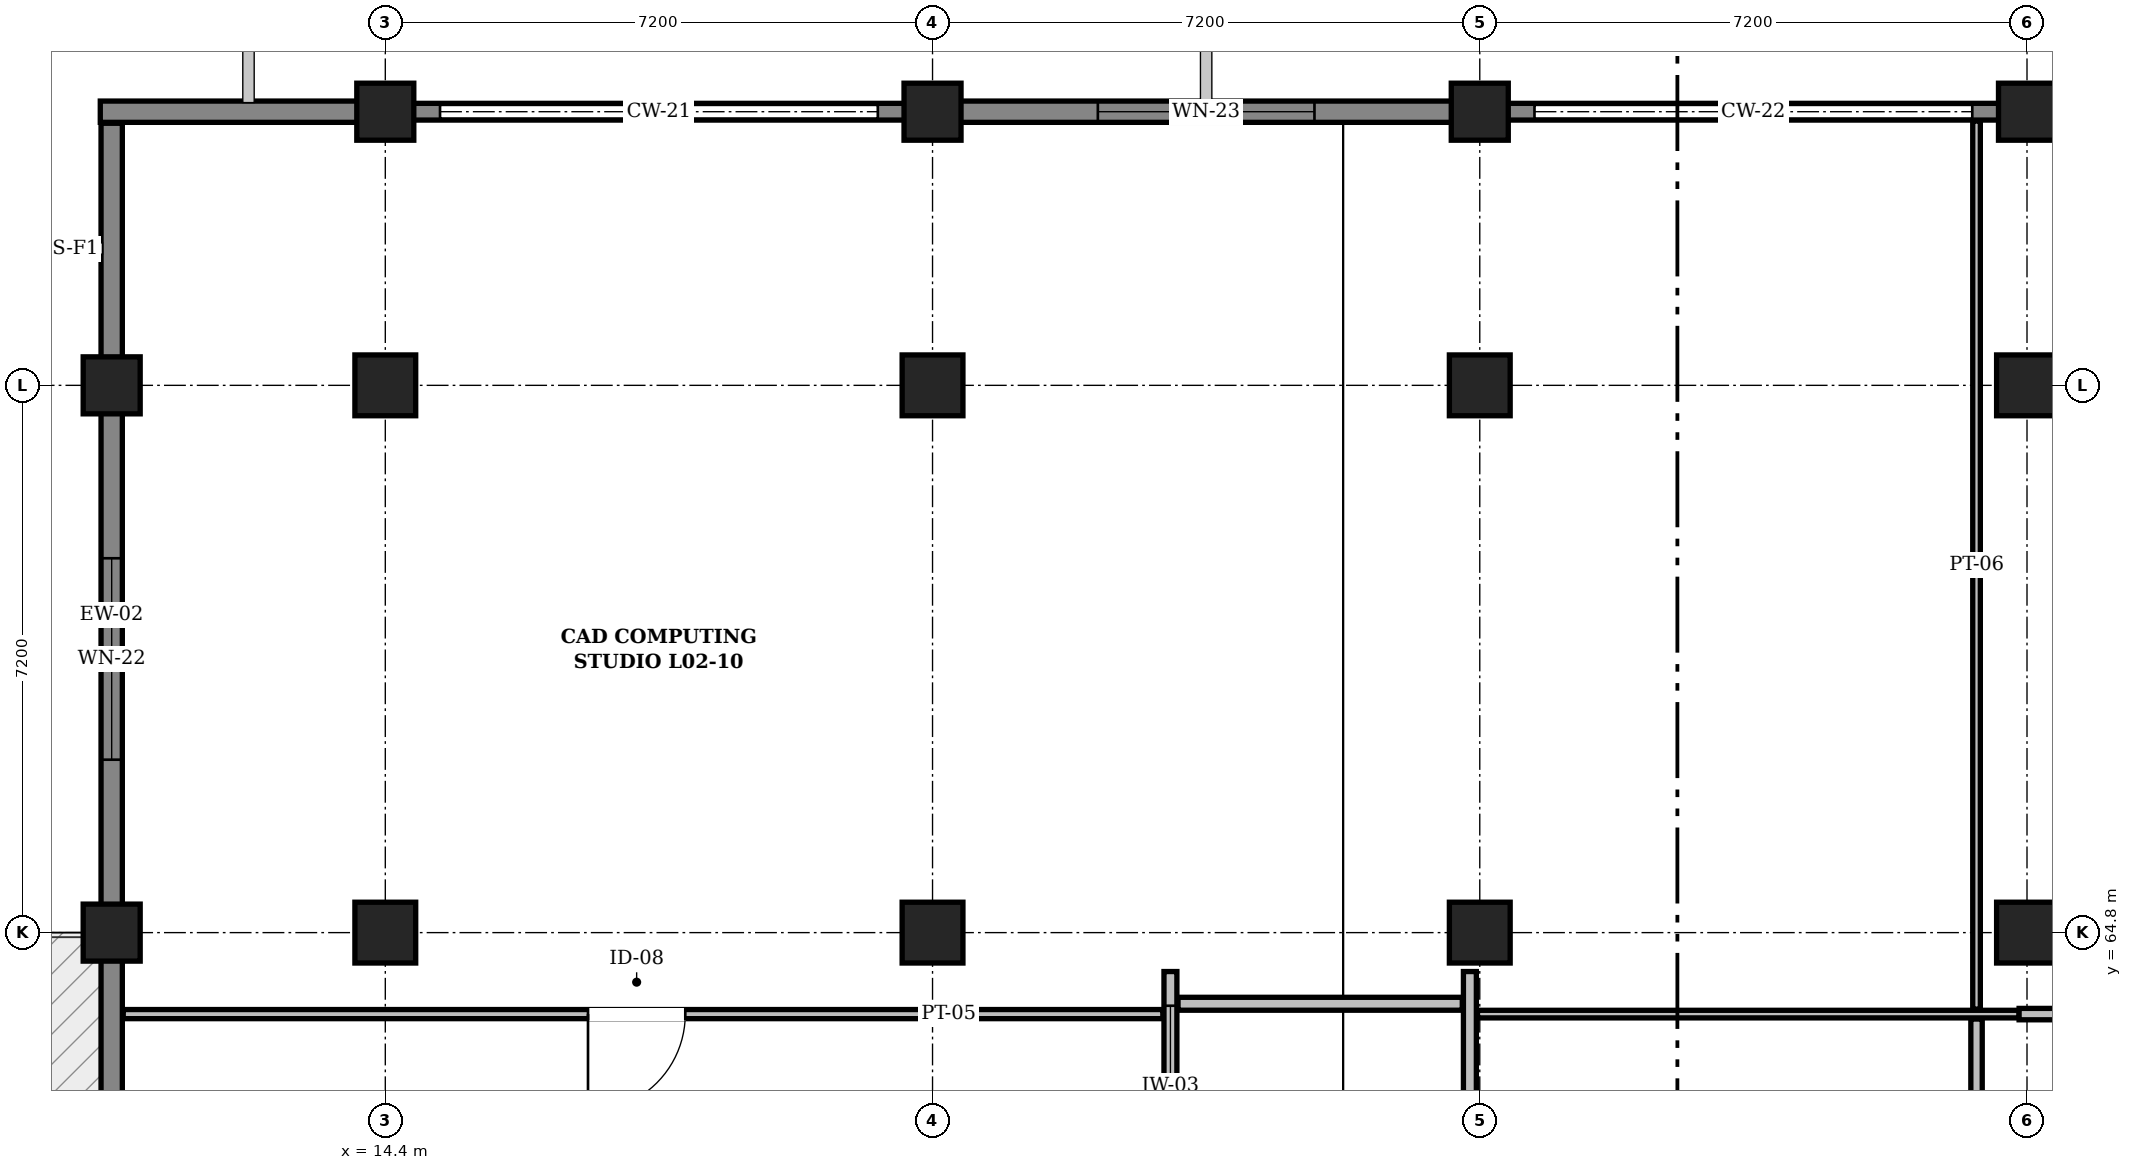
"""IFC4 building model, lengths in metres.
Left out: names, types, materials, properties, quantities, classifications, styles, units other than length and angle.
Written with IfcOpenShell. Run it as: python <this file> out.ifc"""

import sys

from ifc_helpers import new_model, si_unit, direction, frame, frame_2d, origin, origin_2d, place, context, subcontext, project, spatial, rectangle, extrude, element, fill, save


model = new_model("IFC4")
c1 = context("Model", 3, precision=1e-05, world=origin(), true_north=direction((0.0, 1.0)))
c2 = subcontext(c1, "Body", "Model", "MODEL_VIEW")
j1 = project(units=[si_unit("LENGTHUNIT", "METRE"), si_unit("PLANEANGLEUNIT", "RADIAN")], contexts=[c1])
p1 = place(None, origin())
s1 = spatial("IfcSite", under=j1, at=p1, CompositionType="ELEMENT")
p2 = place(p1, origin())
s2 = spatial("IfcBuilding", under=s1, at=p2, CompositionType="ELEMENT")
p3 = place(p2, frame((0.0, 0.0, 9.6)))
s3 = spatial("IfcBuildingStorey", under=s2, at=p3, CompositionType="ELEMENT", Elevation=9.6)
for number, where, z_axis, x_axis in (
    (1, (10.8, 64.8, 0.0), (0.0, 0.0, 1.0), (1.0, 0.0, 0.0)),
    (2, (10.8, 72.0, 0.0), (0.0, 0.0, 1.0), (1.0, 0.0, 0.0)),
):
    element("IfcColumn", number, at=place(p3, frame(where, z_axis=z_axis, x_axis=x_axis)), inside=s3, PredefinedType="COLUMN", context=c2, shape_type="SweptSolid", body=[
        extrude(rectangle(XDim=0.75, YDim=0.75, at=origin_2d()), origin(), (0.0, 0.0, 1.0), 4.8),
    ])
for number, where, z_axis, x_axis in (
    (3, (14.4, 64.8, 0.0), (0.0, 0.0, 1.0), (1.0, 0.0, 0.0)),
    (4, (14.4, 72.0, 0.0), (0.0, 0.0, 1.0), (1.0, 0.0, 0.0)),
):
    element("IfcColumn", number, at=place(p3, frame(where, z_axis=z_axis, x_axis=x_axis)), inside=s3, PredefinedType="COLUMN", context=c2, shape_type="SweptSolid", body=[
        extrude(rectangle(XDim=0.8, YDim=0.8, at=origin_2d()), origin(), (0.0, 0.0, 1.0), 4.8),
    ])
p4 = place(p3, frame((14.4, 75.6, 0.0), z_axis=(0.0, 0.0, 1.0), x_axis=(1.0, 0.0, 0.0)))
e5 = element("IfcColumn", 5, at=p4, inside=s3, PredefinedType="COLUMN", context=c2, shape_type="SweptSolid", body=[
    extrude(rectangle(XDim=0.75, YDim=0.75, at=origin_2d()), origin(), (0.0, 0.0, 1.0), 4.8),
])
for number, where, z_axis, x_axis in (
    (6, (21.6, 64.8, 0.0), (0.0, 0.0, 1.0), (1.0, 0.0, 0.0)),
    (7, (21.6, 72.0, 0.0), (0.0, 0.0, 1.0), (1.0, 0.0, 0.0)),
):
    element("IfcColumn", number, at=place(p3, frame(where, z_axis=z_axis, x_axis=x_axis)), inside=s3, PredefinedType="COLUMN", context=c2, shape_type="SweptSolid", body=[
        extrude(rectangle(XDim=0.8, YDim=0.8, at=origin_2d()), origin(), (0.0, 0.0, 1.0), 4.8),
    ])
p5 = place(p3, frame((21.6, 75.6, 0.0), z_axis=(0.0, 0.0, 1.0), x_axis=(1.0, 0.0, 0.0)))
e8 = element("IfcColumn", 8, at=p5, inside=s3, PredefinedType="COLUMN", context=c2, shape_type="SweptSolid", body=[
    extrude(rectangle(XDim=0.75, YDim=0.75, at=origin_2d()), origin(), (0.0, 0.0, 1.0), 4.8),
])
for number, where, z_axis, x_axis in (
    (9, (28.8, 64.8, 0.0), (0.0, 0.0, 1.0), (1.0, 0.0, 0.0)),
    (10, (28.8, 72.0, 0.0), (0.0, 0.0, 1.0), (1.0, 0.0, 0.0)),
):
    element("IfcColumn", number, at=place(p3, frame(where, z_axis=z_axis, x_axis=x_axis)), inside=s3, PredefinedType="COLUMN", context=c2, shape_type="SweptSolid", body=[
        extrude(rectangle(XDim=0.8, YDim=0.8, at=origin_2d()), origin(), (0.0, 0.0, 1.0), 4.8),
    ])
p6 = place(p3, frame((28.8, 75.6, 0.0), z_axis=(0.0, 0.0, 1.0), x_axis=(1.0, 0.0, 0.0)))
e11 = element("IfcColumn", 11, at=p6, inside=s3, PredefinedType="COLUMN", context=c2, shape_type="SweptSolid", body=[
    extrude(rectangle(XDim=0.75, YDim=0.75, at=origin_2d()), origin(), (0.0, 0.0, 1.0), 4.8),
])
for number, where, z_axis, x_axis in (
    (12, (36.0, 64.8, 0.0), (0.0, 0.0, 1.0), (1.0, 0.0, 0.0)),
    (13, (36.0, 72.0, 0.0), (0.0, 0.0, 1.0), (1.0, 0.0, 0.0)),
):
    element("IfcColumn", number, at=place(p3, frame(where, z_axis=z_axis, x_axis=x_axis)), inside=s3, PredefinedType="COLUMN", context=c2, shape_type="SweptSolid", body=[
        extrude(rectangle(XDim=0.8, YDim=0.8, at=origin_2d()), origin(), (0.0, 0.0, 1.0), 4.8),
    ])
p7 = place(p3, frame((36.0, 75.6, 0.0), z_axis=(0.0, 0.0, 1.0), x_axis=(1.0, 0.0, 0.0)))
e14 = element("IfcColumn", 14, at=p7, inside=s3, PredefinedType="COLUMN", context=c2, shape_type="SweptSolid", body=[
    extrude(rectangle(XDim=0.75, YDim=0.75, at=origin_2d()), origin(), (0.0, 0.0, 1.0), 4.8),
])
p8 = place(p3, frame((10.8, 57.6, 0.0), z_axis=(0.0, 0.0, 1.0), x_axis=(0.0, 1.0, 0.0)))
e15 = element("IfcWall", 15, at=p8, inside=s3, PredefinedType="SOLIDWALL", context=c2, shape_type="SweptSolid", body=[
    extrude(rectangle(XDim=7.2, YDim=0.28, at=frame_2d((3.6, 0.0))), origin(), (0.0, 0.0, 1.0), 4.52),
])
p9 = place(p8, frame((2.94, 0.0, 0.0)))
e16 = element("IfcOpeningElement", 16, at=p9, cuts=e15, PredefinedType="OPENING", context=c2, shape_type="SweptSolid", body=[
    extrude(rectangle(XDim=1.32, YDim=2.2, at=frame_2d((0.66, 1.1))), frame((0.0, 0.152, 0.0), z_axis=(0.0, -1.0, 0.0), x_axis=(1.0, 0.0, 0.0)), (0.0, 0.0, 1.0), 0.304),
])
p10 = place(p3, frame((10.8, 64.8, 0.0), z_axis=(0.0, 0.0, 1.0), x_axis=(0.0, 1.0, 0.0)))
e17 = element("IfcWall", 17, at=p10, inside=s3, PredefinedType="SOLIDWALL", context=c2, shape_type="SweptSolid", body=[
    extrude(rectangle(XDim=7.2, YDim=0.28, at=frame_2d((3.6, 0.0))), origin(), (0.0, 0.0, 1.0), 4.52),
])
p11 = place(p10, frame((2.275, 0.0, 0.95)))
e18 = element("IfcOpeningElement", 18, at=p11, cuts=e17, PredefinedType="OPENING", context=c2, shape_type="SweptSolid", body=[
    extrude(rectangle(XDim=2.65, YDim=1.55, at=frame_2d((1.325, 0.775))), frame((0.0, 0.152, 0.0), z_axis=(0.0, -1.0, 0.0), x_axis=(1.0, 0.0, 0.0)), (0.0, 0.0, 1.0), 0.304),
])
p12 = place(p3, frame((10.8, 72.0, 0.0), z_axis=(0.0, 0.0, 1.0), x_axis=(0.0, 1.0, 0.0)))
e19 = element("IfcWall", 19, at=p12, inside=s3, PredefinedType="SOLIDWALL", context=c2, shape_type="SweptSolid", body=[
    extrude(rectangle(XDim=3.448, YDim=0.28, at=frame_2d((1.724, 0.0))), origin(), (0.0, 0.0, 1.0), 4.52),
])
p13 = place(p3, frame((10.65, 75.6, 0.0), z_axis=(0.0, 0.0, 1.0), x_axis=(1.0, 0.0, 0.0)))
e20 = element("IfcWall", 20, at=p13, inside=s3, PredefinedType="SOLIDWALL", context=c2, shape_type="SweptSolid", body=[
    extrude(rectangle(XDim=3.75, YDim=0.28, at=frame_2d((1.875, 0.0))), origin(), (0.0, 0.0, 1.0), 4.52),
])
p14 = place(p3, frame((14.4, 75.6, 0.0), z_axis=(0.0, 0.0, 1.0), x_axis=(1.0, 0.0, 0.0)))
e21 = element("IfcWall", 21, at=p14, inside=s3, PredefinedType="SOLIDWALL", context=c2, shape_type="SweptSolid", body=[
    extrude(rectangle(XDim=7.2, YDim=0.22, at=frame_2d((3.6, 0.0))), origin(), (0.0, 0.0, 1.0), 1.24),
])
p15 = place(p3, frame((21.6, 75.6, 0.0), z_axis=(0.0, 0.0, 1.0), x_axis=(1.0, 0.0, 0.0)))
e22 = element("IfcWall", 22, at=p15, inside=s3, PredefinedType="SOLIDWALL", context=c2, shape_type="SweptSolid", body=[
    extrude(rectangle(XDim=7.2, YDim=0.28, at=frame_2d((3.6, 0.0))), origin(), (0.0, 0.0, 1.0), 4.52),
])
p16 = place(p15, frame((2.175, 0.0, 0.95)))
e23 = element("IfcOpeningElement", 23, at=p16, cuts=e22, PredefinedType="OPENING", context=c2, shape_type="SweptSolid", body=[
    extrude(rectangle(XDim=2.85, YDim=1.55, at=frame_2d((1.425, 0.775))), frame((0.0, 0.152, 0.0), z_axis=(0.0, -1.0, 0.0), x_axis=(1.0, 0.0, 0.0)), (0.0, 0.0, 1.0), 0.304),
])
p17 = place(p3, frame((28.8, 75.6, 0.0), z_axis=(0.0, 0.0, 1.0), x_axis=(1.0, 0.0, 0.0)))
e24 = element("IfcWall", 24, at=p17, inside=s3, PredefinedType="SOLIDWALL", context=c2, shape_type="SweptSolid", body=[
    extrude(rectangle(XDim=7.2, YDim=0.22, at=frame_2d((3.6, 0.0))), origin(), (0.0, 0.0, 1.0), 1.24),
])
p18 = place(p3, frame((36.0, 75.6, 0.0), z_axis=(0.0, 0.0, 1.0), x_axis=(1.0, 0.0, 0.0)))
e25 = element("IfcWall", 25, at=p18, inside=s3, PredefinedType="SOLIDWALL", context=c2, shape_type="SweptSolid", body=[
    extrude(rectangle(XDim=7.35, YDim=0.28, at=frame_2d((3.675, 0.0))), origin(), (0.0, 0.0, 1.0), 4.52),
])
p19 = place(p18, frame((2.125, 0.0, 0.95)))
e26 = element("IfcOpeningElement", 26, at=p19, cuts=e25, PredefinedType="OPENING", context=c2, shape_type="SweptSolid", body=[
    extrude(rectangle(XDim=3.1, YDim=1.55, at=frame_2d((1.55, 0.775))), frame((0.0, 0.152, 0.0), z_axis=(0.0, -1.0, 0.0), x_axis=(1.0, 0.0, 0.0)), (0.0, 0.0, 1.0), 0.304),
])
p20 = place(p3, frame((28.67, 58.01, 0.0), z_axis=(0.0, 0.0, 1.0), x_axis=(0.0, 1.0, 0.0)))
e27 = element("IfcWall", 27, at=p20, inside=s3, PredefinedType="PARTITIONING", context=c2, shape_type="SweptSolid", body=[
    extrude(rectangle(XDim=6.278, YDim=0.17, at=frame_2d((3.139, 0.0))), origin(), (0.0, 0.0, 1.0), 4.03),
])
p21 = place(p3, frame((24.73, 48.536, 0.0), z_axis=(0.0, 0.0, 1.0), x_axis=(0.0, 1.0, 0.0)))
e28 = element("IfcWall", 28, at=p21, inside=s3, PredefinedType="PARTITIONING", context=c2, shape_type="SweptSolid", body=[
    extrude(rectangle(XDim=15.752, YDim=0.17, at=frame_2d((7.876, 0.0))), origin(), (0.0, 0.0, 1.0), 4.46),
])
p22 = place(p21, frame((7.266, 0.0, 0.0)))
e29 = element("IfcOpeningElement", 29, at=p22, cuts=e28, PredefinedType="OPENING", context=c2, shape_type="SweptSolid", body=[
    extrude(rectangle(XDim=1.22, YDim=2.22, at=frame_2d((0.61, 1.11))), frame((0.0, 0.097, 0.0), z_axis=(0.0, -1.0, 0.0), x_axis=(1.0, 0.0, 0.0)), (0.0, 0.0, 1.0), 0.194),
])
p23 = place(p21, frame((13.202, 0.0, 1.05)))
e30 = element("IfcOpeningElement", 30, at=p23, cuts=e28, PredefinedType="OPENING", context=c2, shape_type="SweptSolid", body=[
    extrude(rectangle(XDim=2.1, YDim=1.05, at=frame_2d((1.05, 0.525))), frame((0.0, 0.097, 0.0), z_axis=(0.0, -1.0, 0.0), x_axis=(1.0, 0.0, 0.0)), (0.0, 0.0, 1.0), 0.194),
])
p24 = place(p3, frame((24.83, 63.864, 0.0), z_axis=(0.0, 0.0, 1.0), x_axis=(1.0, 0.0, 0.0)))
e31 = element("IfcWall", 31, at=p24, inside=s3, PredefinedType="PARTITIONING", context=c2, shape_type="SweptSolid", body=[
    extrude(rectangle(XDim=3.74, YDim=0.17, at=frame_2d((1.87, 0.0))), origin(), (0.0, 0.0, 1.0), 4.46),
])
p25 = place(p3, frame((28.77, 63.728, 0.0), z_axis=(0.0, 0.0, 1.0), x_axis=(1.0, 0.0, 0.0)))
e32 = element("IfcWall", 32, at=p25, inside=s3, PredefinedType="PARTITIONING", context=c2, shape_type="SweptSolid", body=[
    extrude(rectangle(XDim=7.126, YDim=0.1, at=frame_2d((3.563, 0.0))), origin(), (0.0, 0.0, 1.0), 4.46),
])
p26 = place(p3, frame((35.336, 53.12, 0.0), z_axis=(0.0, 0.0, 1.0), x_axis=(0.0, 1.0, 0.0)))
e33 = element("IfcWall", 33, at=p26, inside=s3, PredefinedType="PARTITIONING", context=c2, shape_type="SweptSolid", body=[
    extrude(rectangle(XDim=10.543, YDim=0.15, at=frame_2d((5.271, 0.0))), origin(), (0.0, 0.0, 1.0), 4.46),
])
p27 = place(p3, frame((10.952, 63.728, 0.0), z_axis=(0.0, 0.0, 1.0), x_axis=(1.0, 0.0, 0.0)))
e34 = element("IfcWall", 34, at=p27, inside=s3, PredefinedType="PARTITIONING", context=c2, shape_type="SweptSolid", body=[
    extrude(rectangle(XDim=13.678, YDim=0.12, at=frame_2d((6.839, 0.0))), origin(), (0.0, 0.0, 1.0), 4.46),
])
p28 = place(p27, frame((6.115, 0.0, 0.0)))
e35 = element("IfcOpeningElement", 35, at=p28, cuts=e34, PredefinedType="OPENING", context=c2, shape_type="SweptSolid", body=[
    extrude(rectangle(XDim=1.28, YDim=2.22, at=frame_2d((0.64, 1.11))), frame((0.0, 0.072, 0.0), z_axis=(0.0, -1.0, 0.0), x_axis=(1.0, 0.0, 0.0)), (0.0, 0.0, 1.0), 0.144),
])
p29 = place(p3, frame((35.336, 63.793, 0.0), z_axis=(0.0, 0.0, 1.0), x_axis=(0.0, 1.0, 0.0)))
e36 = element("IfcWall", 36, at=p29, inside=s3, PredefinedType="PARTITIONING", context=c2, shape_type="SweptSolid", body=[
    extrude(rectangle(XDim=11.685, YDim=0.1, at=frame_2d((5.843, 0.0))), origin(), (0.0, 0.0, 1.0), 4.46),
])
p30 = place(p3, frame((35.896, 63.728, 0.0), z_axis=(0.0, 0.0, 1.0), x_axis=(1.0, 0.0, 0.0)))
e37 = element("IfcWall", 37, at=p30, inside=s3, PredefinedType="PARTITIONING", context=c2, shape_type="SweptSolid", body=[
    extrude(rectangle(XDim=7.152, YDim=0.15, at=frame_2d((3.576, 0.0))), origin(), (0.0, 0.0, 1.0), 4.46),
])
p31 = place(p11, origin())
e38 = element("IfcWindow", 38, at=p31, inside=s3, PartitioningType="SINGLE_PANEL", PredefinedType="WINDOW", context=c2, shape_type="SweptSolid", body=[
    extrude(rectangle(XDim=2.65, YDim=1.55, at=frame_2d((1.325, 0.775))), frame((0.0, 0.03, 0.0), z_axis=(0.0, -1.0, 0.0), x_axis=(1.0, 0.0, 0.0)), (0.0, 0.0, 1.0), 0.06),
])
fill(e18, e38)
p32 = place(p16, origin())
e39 = element("IfcWindow", 39, at=p32, inside=s3, PartitioningType="SINGLE_PANEL", PredefinedType="WINDOW", context=c2, shape_type="SweptSolid", body=[
    extrude(rectangle(XDim=2.85, YDim=1.55, at=frame_2d((1.425, 0.775))), frame((0.0, 0.03, 0.0), z_axis=(0.0, -1.0, 0.0), x_axis=(1.0, 0.0, 0.0)), (0.0, 0.0, 1.0), 0.06),
])
fill(e23, e39)
p33 = place(p23, origin())
e40 = element("IfcWindow", 40, at=p33, inside=s3, PartitioningType="SINGLE_PANEL", PredefinedType="WINDOW", context=c2, shape_type="SweptSolid", body=[
    extrude(rectangle(XDim=2.1, YDim=1.05, at=frame_2d((1.05, 0.525))), frame((0.0, 0.03, 0.0), z_axis=(0.0, -1.0, 0.0), x_axis=(1.0, 0.0, 0.0)), (0.0, 0.0, 1.0), 0.06),
])
fill(e30, e40)
p34 = place(p28, frame((1.28, 0.0, 0.0), z_axis=(0.0, 0.0, 1.0), x_axis=(-1.0, 0.0, 0.0)))
e41 = element("IfcDoor", 41, at=p34, inside=s3, OperationType="SINGLE_SWING_RIGHT", PredefinedType="DOOR", context=c2, shape_type="SweptSolid", body=[
    extrude(rectangle(XDim=1.28, YDim=2.22, at=frame_2d((0.64, 1.11))), frame((0.0, 0.025, 0.0), z_axis=(0.0, -1.0, 0.0), x_axis=(1.0, 0.0, 0.0)), (0.0, 0.0, 1.0), 0.05),
])
fill(e35, e41)
save(model, sys.argv[1])
